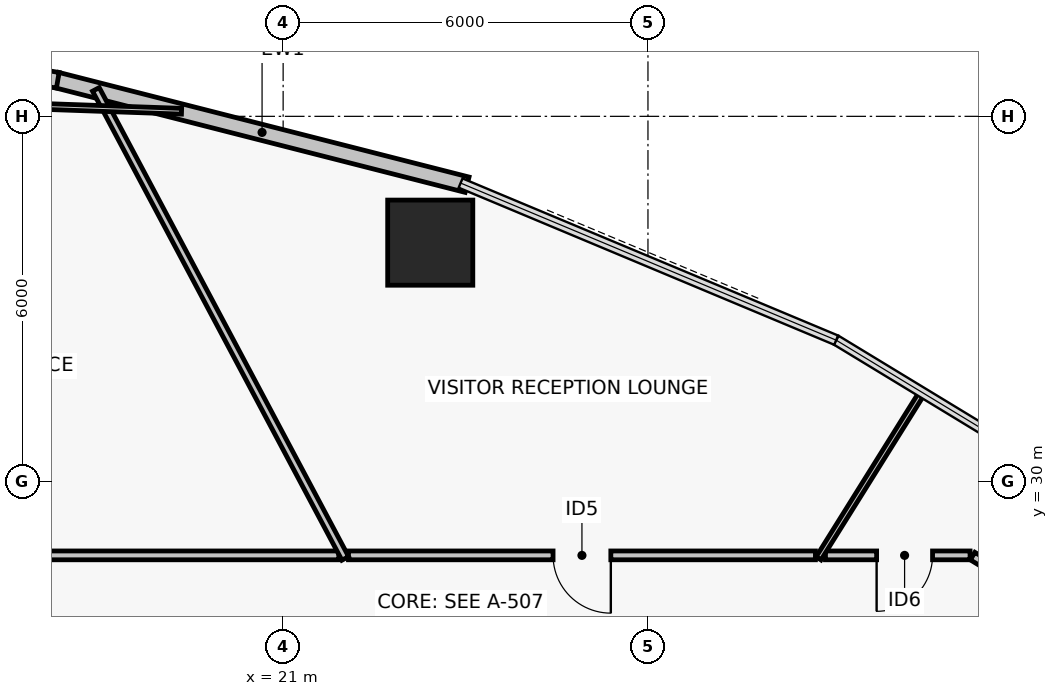
"""IFC4 building model, lengths in metres.
Left out: names, types, materials, properties, quantities, classifications, styles, units other than length and angle.
Written with IfcOpenShell. Run it as: python <this file> out.ifc"""

import sys

from ifc_helpers import new_model, si_unit, direction, frame, frame_2d, origin, origin_2d, place, context, subcontext, project, spatial, rectangle, hollow_rectangle, extrude, element, fill, save


model = new_model("IFC4")
c1 = context("Model", 3, precision=1e-05, world=origin(), true_north=direction((0.0, 1.0)))
c2 = subcontext(c1, "Body", "Model", "MODEL_VIEW")
j1 = project(units=[si_unit("LENGTHUNIT", "METRE"), si_unit("PLANEANGLEUNIT", "RADIAN")], contexts=[c1])
p1 = place(None, origin())
s1 = spatial("IfcSite", under=j1, at=p1, CompositionType="ELEMENT")
p2 = place(p1, origin())
s2 = spatial("IfcBuilding", under=s1, at=p2, CompositionType="ELEMENT")
p3 = place(p2, frame((0.0, 0.0, 35.04)))
s3 = spatial("IfcBuildingStorey", under=s2, at=p3, CompositionType="ELEMENT", Elevation=35.04)
p4 = place(p3, frame((23.419, 33.923, 0.0), z_axis=(0.0, 0.0, 1.0), x_axis=(1.0, 0.0, 0.0)))
e1 = element("IfcColumn", 1, at=p4, inside=s3, PredefinedType="COLUMN", context=c2, shape_type="SweptSolid", body=[
    extrude(hollow_rectangle(XDim=1.4, YDim=1.4, WallThickness=0.055, at=origin_2d()), origin(), (0.0, 0.0, 1.0), 3.72),
])
p5 = place(p3, frame((17.282, 36.596, 0.0), z_axis=(0.0, 0.0, 1.0), x_axis=(0.968977974408, -0.247147092057, 0.0)))
e2 = element("IfcWall", 2, at=p5, inside=s3, PredefinedType="PARTITIONING", context=c2, shape_type="SweptSolid", body=[
    extrude(rectangle(XDim=6.959, YDim=0.26, at=frame_2d((3.479, 0.0))), origin(), (0.0, 0.0, 1.0), 3.47),
])
p6 = place(p3, frame((14.915, 36.997, 0.0), z_axis=(0.0, 0.0, 1.0), x_axis=(0.985905469923, -0.167303330437, 0.0)))
e3 = element("IfcWall", 3, at=p6, inside=s3, PredefinedType="PARTITIONING", context=c2, shape_type="SweptSolid", body=[
    extrude(rectangle(XDim=2.412, YDim=0.26, at=frame_2d((1.206, 0.0))), origin(), (0.0, 0.0, 1.0), 3.47),
])
p7 = place(p3, frame((32.842, 28.463, 0.0), z_axis=(0.0, 0.0, 1.0), x_axis=(-0.854807247113, 0.518945633264, 0.0)))
e4 = element("IfcWall", 4, at=p7, inside=s3, PredefinedType="PARTITIONING", context=c2, shape_type="SweptSolid", body=[
    extrude(rectangle(XDim=0.588, YDim=0.145, at=frame_2d((0.294, 0.0))), origin(), (0.0, 0.0, 1.0), 3.0),
])
p8 = place(p3, frame((32.297, 28.78, 0.0), z_axis=(0.0, 0.0, 1.0), x_axis=(-1.0, 0.0, 0.0)))
e5 = element("IfcWall", 5, at=p8, inside=s3, PredefinedType="PARTITIONING", context=c2, shape_type="SweptSolid", body=[
    extrude(rectangle(XDim=2.378, YDim=0.145, at=frame_2d((1.189, 0.0))), origin(), (0.0, 0.0, 1.0), 3.0),
])
p9 = place(p8, frame((0.617, 0.0, 0.0)))
e6 = element("IfcOpeningElement", 6, at=p9, cuts=e5, PredefinedType="OPENING", context=c2, shape_type="SweptSolid", body=[
    extrude(rectangle(XDim=0.92, YDim=2.05, at=frame_2d((0.46, 1.025))), frame((0.0, 0.083, 0.0), z_axis=(0.0, -1.0, 0.0), x_axis=(1.0, 0.0, 0.0)), (0.0, 0.0, 1.0), 0.165),
])
p10 = place(p3, frame((29.754, 28.78, 0.0), z_axis=(0.0, 0.0, 1.0), x_axis=(-1.0, 0.0, 0.0)))
e7 = element("IfcWall", 7, at=p10, inside=s3, PredefinedType="PARTITIONING", context=c2, shape_type="SweptSolid", body=[
    extrude(rectangle(XDim=7.68, YDim=0.145, at=frame_2d((3.84, 0.0))), origin(), (0.0, 0.0, 1.0), 2.6),
])
p11 = place(p10, frame((3.365, 0.0, 0.0)))
e8 = element("IfcOpeningElement", 8, at=p11, cuts=e7, PredefinedType="OPENING", context=c2, shape_type="SweptSolid", body=[
    extrude(rectangle(XDim=0.95, YDim=2.06, at=frame_2d((0.475, 1.03))), frame((0.0, 0.083, 0.0), z_axis=(0.0, -1.0, 0.0), x_axis=(1.0, 0.0, 0.0)), (0.0, 0.0, 1.0), 0.165),
])
p12 = place(p3, frame((21.916, 28.78, 0.0), z_axis=(0.0, 0.0, 1.0), x_axis=(-1.0, 0.0, 0.0)))
e9 = element("IfcWall", 9, at=p12, inside=s3, PredefinedType="PARTITIONING", context=c2, shape_type="SweptSolid", body=[
    extrude(rectangle(XDim=6.016, YDim=0.145, at=frame_2d((3.008, 0.0))), origin(), (0.0, 0.0, 1.0), 2.6),
])
p13 = place(p3, frame((29.805, 28.73, 0.0), z_axis=(0.0, 0.0, 1.0), x_axis=(0.529903768235, 0.848057778934, 0.0)))
e10 = element("IfcWall", 10, at=p13, inside=s3, PredefinedType="PARTITIONING", context=c2, shape_type="SweptSolid", body=[
    extrude(rectangle(XDim=3.228, YDim=0.095, at=frame_2d((1.614, 0.0))), origin(), (0.0, 0.0, 1.0), 2.85),
])
p14 = place(p3, frame((22.021, 28.73, 0.0), z_axis=(0.0, 0.0, 1.0), x_axis=(-0.469465111929, 0.88295102281, 0.0)))
e11 = element("IfcWall", 11, at=p14, inside=s3, PredefinedType="PARTITIONING", context=c2, shape_type="SweptSolid", body=[
    extrude(rectangle(XDim=8.736, YDim=0.125, at=frame_2d((4.368, 0.0))), origin(), (0.0, 0.0, 1.0), 2.85),
])
p15 = place(p3, frame((19.329, 36.084, 0.0), z_axis=(0.0, 0.0, 1.0), x_axis=(-0.999389725088, 0.03493103762, 0.0)))
e12 = element("IfcWall", 12, at=p15, inside=s3, PredefinedType="PARTITIONING", context=c2, shape_type="SweptSolid", body=[
    extrude(rectangle(XDim=3.641, YDim=0.095, at=frame_2d((1.821, 0.0))), origin(), (0.0, 0.0, 1.0), 3.47),
])
p16 = place(p9, origin())
e13 = element("IfcDoor", 13, at=p16, inside=s3, OperationType="SINGLE_SWING_RIGHT", PredefinedType="DOOR", context=c2, shape_type="SweptSolid", body=[
    extrude(rectangle(XDim=0.92, YDim=2.05, at=frame_2d((0.46, 1.025))), frame((0.0, 0.025, 0.0), z_axis=(0.0, -1.0, 0.0), x_axis=(1.0, 0.0, 0.0)), (0.0, 0.0, 1.0), 0.05),
])
fill(e6, e13)
p17 = place(p11, origin())
e14 = element("IfcDoor", 14, at=p17, inside=s3, OperationType="SINGLE_SWING_LEFT", PredefinedType="DOOR", context=c2, shape_type="SweptSolid", body=[
    extrude(rectangle(XDim=0.95, YDim=2.06, at=frame_2d((0.475, 1.03))), frame((0.0, 0.025, 0.0), z_axis=(0.0, -1.0, 0.0), x_axis=(1.0, 0.0, 0.0)), (0.0, 0.0, 1.0), 0.05),
])
fill(e8, e14)
save(model, sys.argv[1])
